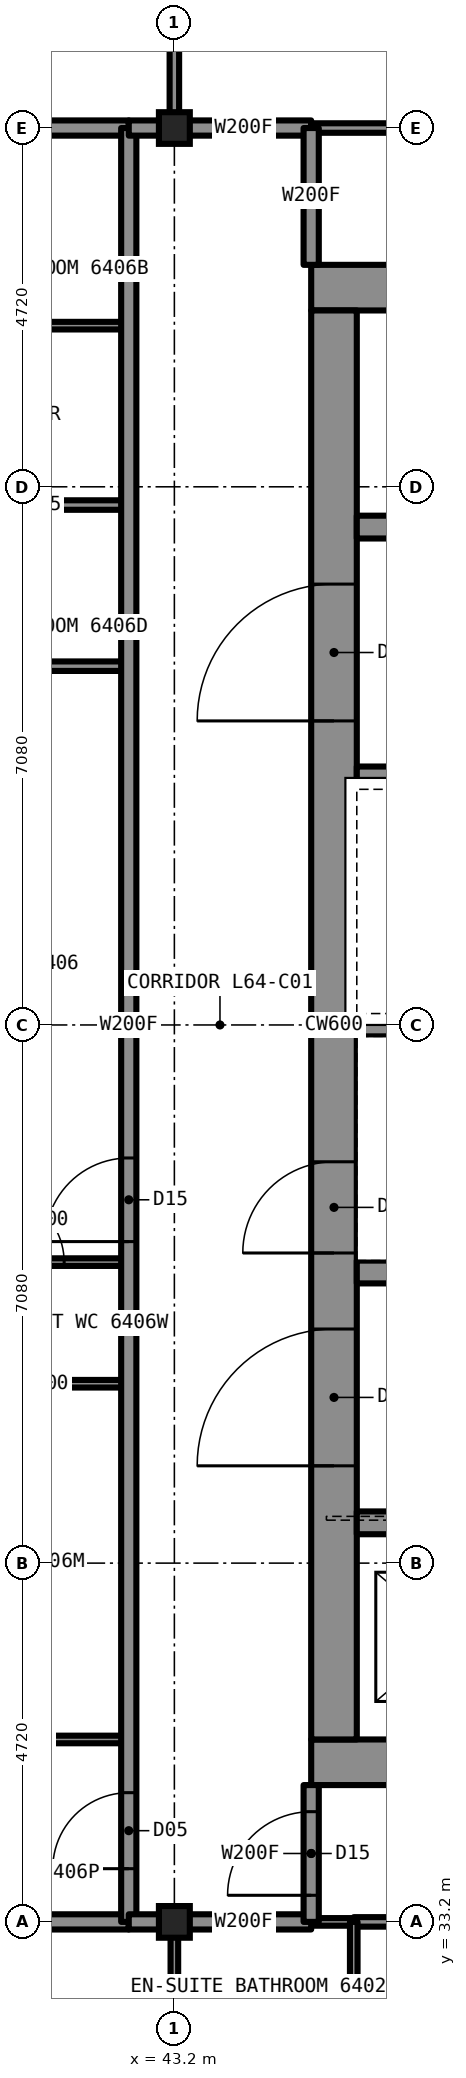
"""IFC4 building model, lengths in metres.
Left out: names, types, materials, properties, quantities, classifications, styles, units other than length and angle.
Written with IfcOpenShell. Run it as: python <this file> out.ifc"""

import sys

from ifc_helpers import new_model, si_unit, direction, frame, frame_2d, origin, origin_2d, place, context, subcontext, project, spatial, rectangle, i_section, extrude, element, fill, save


model = new_model("IFC4")
c1 = context("Model", 3, precision=1e-05, world=origin(), true_north=direction((0.0, 1.0)))
c2 = subcontext(c1, "Body", "Model", "MODEL_VIEW")
j1 = project(units=[si_unit("LENGTHUNIT", "METRE"), si_unit("PLANEANGLEUNIT", "RADIAN")], contexts=[c1])
p1 = place(None, origin())
s1 = spatial("IfcSite", under=j1, at=p1, CompositionType="ELEMENT")
p2 = place(p1, origin())
s2 = spatial("IfcBuilding", under=s1, at=p2, CompositionType="ELEMENT")
p3 = place(p2, frame((0.0, 0.0, 237.2)))
s3 = spatial("IfcBuildingStorey", under=s2, at=p3, CompositionType="ELEMENT", Elevation=237.2)
for number, where, z_axis, x_axis in (
    (1, (43.2, 33.2, 0.0), (0.0, 0.0, 1.0), (1.0, 0.0, 0.0)),
    (2, (43.2, 56.8, 0.0), (0.0, 0.0, 1.0), (1.0, 0.0, 0.0)),
):
    element("IfcColumn", number, at=place(p3, frame(where, z_axis=z_axis, x_axis=x_axis)), inside=s3, PredefinedType="COLUMN", context=c2, shape_type="SweptSolid", body=[
        extrude(i_section(OverallWidth=0.406, OverallDepth=0.417, WebThickness=0.03, FlangeThickness=0.048, at=origin_2d()), origin(), (0.0, 0.0, 1.0), 3.5),
    ])
for number, where, z_axis, x_axis in (
    (3, (45.0, 54.7, 0.0), (0.0, 0.0, 1.0), (1.0, 0.0, 0.0)),
    (4, (45.0, 35.3, 0.0), (0.0, 0.0, 1.0), (1.0, 0.0, 0.0)),
):
    element("IfcWall", number, at=place(p3, frame(where, z_axis=z_axis, x_axis=x_axis)), inside=s3, PredefinedType="SHEAR", context=c2, shape_type="SweptSolid", body=[
        extrude(rectangle(XDim=20.0, YDim=0.6, at=frame_2d((10.0, 0.0))), origin(), (0.0, 0.0, 1.0), 3.5),
    ])
p4 = place(p3, frame((45.3, 35.6, 0.0), z_axis=(0.0, 0.0, 1.0), x_axis=(0.0, 1.0, 0.0)))
e5 = element("IfcWall", 5, at=p4, inside=s3, PredefinedType="SHEAR", context=c2, shape_type="SweptSolid", body=[
    extrude(rectangle(XDim=18.8, YDim=0.6, at=frame_2d((9.4, 0.0))), origin(), (0.0, 0.0, 1.0), 3.5),
])
p5 = place(p4, frame((13.4, 0.0, 0.0)))
e6 = element("IfcOpeningElement", 6, at=p5, cuts=e5, PredefinedType="OPENING", context=c2, shape_type="SweptSolid", body=[
    extrude(rectangle(XDim=1.8, YDim=2.2, at=frame_2d((0.9, 1.1))), frame((0.0, 0.31, 0.0), z_axis=(0.0, -1.0, 0.0), x_axis=(1.0, 0.0, 0.0)), (0.0, 0.0, 1.0), 0.62),
])
p6 = place(p4, frame((3.6, 0.0, 0.0)))
e7 = element("IfcOpeningElement", 7, at=p6, cuts=e5, PredefinedType="OPENING", context=c2, shape_type="SweptSolid", body=[
    extrude(rectangle(XDim=1.8, YDim=2.2, at=frame_2d((0.9, 1.1))), frame((0.0, 0.31, 0.0), z_axis=(0.0, -1.0, 0.0), x_axis=(1.0, 0.0, 0.0)), (0.0, 0.0, 1.0), 0.62),
])
p7 = place(p4, frame((6.4, 0.0, 0.0)))
e8 = element("IfcOpeningElement", 8, at=p7, cuts=e5, PredefinedType="OPENING", context=c2, shape_type="SweptSolid", body=[
    extrude(rectangle(XDim=1.2, YDim=2.2, at=frame_2d((0.6, 1.1))), frame((0.0, 0.31, 0.0), z_axis=(0.0, -1.0, 0.0), x_axis=(1.0, 0.0, 0.0)), (0.0, 0.0, 1.0), 0.62),
])
p8 = place(p3, frame((45.6, 51.55, 0.0), z_axis=(0.0, 0.0, 1.0), x_axis=(1.0, 0.0, 0.0)))
e9 = element("IfcWall", 9, at=p8, inside=s3, PredefinedType="SHEAR", context=c2, shape_type="SweptSolid", body=[
    extrude(rectangle(XDim=18.8, YDim=0.3, at=frame_2d((9.4, 0.0))), origin(), (0.0, 0.0, 1.0), 3.5),
])
p9 = place(p8, frame((4.8, 0.0, 0.0)))
e10 = element("IfcOpeningElement", 10, at=p9, cuts=e9, PredefinedType="OPENING", context=c2, shape_type="SweptSolid", body=[
    extrude(rectangle(XDim=1.0, YDim=2.1, at=frame_2d((0.5, 1.05))), frame((0.0, 0.16, 0.0), z_axis=(0.0, -1.0, 0.0), x_axis=(1.0, 0.0, 0.0)), (0.0, 0.0, 1.0), 0.32),
])
p10 = place(p8, frame((11.6, 0.0, 0.0)))
e11 = element("IfcOpeningElement", 11, at=p10, cuts=e9, PredefinedType="OPENING", context=c2, shape_type="SweptSolid", body=[
    extrude(rectangle(XDim=1.1, YDim=2.2, at=frame_2d((0.55, 1.1))), frame((0.0, 0.16, 0.0), z_axis=(0.0, -1.0, 0.0), x_axis=(1.0, 0.0, 0.0)), (0.0, 0.0, 1.0), 0.32),
])
p11 = place(p8, frame((14.3, 0.0, 0.0)))
e12 = element("IfcOpeningElement", 12, at=p11, cuts=e9, PredefinedType="OPENING", context=c2, shape_type="SweptSolid", body=[
    extrude(rectangle(XDim=1.1, YDim=2.2, at=frame_2d((0.55, 1.1))), frame((0.0, 0.16, 0.0), z_axis=(0.0, -1.0, 0.0), x_axis=(1.0, 0.0, 0.0)), (0.0, 0.0, 1.0), 0.32),
])
p12 = place(p3, frame((45.6, 38.45, 0.0), z_axis=(0.0, 0.0, 1.0), x_axis=(1.0, 0.0, 0.0)))
e13 = element("IfcWall", 13, at=p12, inside=s3, PredefinedType="SHEAR", context=c2, shape_type="SweptSolid", body=[
    extrude(rectangle(XDim=18.8, YDim=0.3, at=frame_2d((9.4, 0.0))), origin(), (0.0, 0.0, 1.0), 3.5),
])
p13 = place(p12, frame((0.7, 0.0, 0.0)))
e14 = element("IfcOpeningElement", 14, at=p13, cuts=e13, PredefinedType="OPENING", context=c2, shape_type="SweptSolid", body=[
    extrude(rectangle(XDim=1.1, YDim=2.2, at=frame_2d((0.55, 1.1))), frame((0.0, 0.16, 0.0), z_axis=(0.0, -1.0, 0.0), x_axis=(1.0, 0.0, 0.0)), (0.0, 0.0, 1.0), 0.32),
])
p14 = place(p12, frame((3.4, 0.0, 0.0)))
e15 = element("IfcOpeningElement", 15, at=p14, cuts=e13, PredefinedType="OPENING", context=c2, shape_type="SweptSolid", body=[
    extrude(rectangle(XDim=1.1, YDim=2.2, at=frame_2d((0.55, 1.1))), frame((0.0, 0.16, 0.0), z_axis=(0.0, -1.0, 0.0), x_axis=(1.0, 0.0, 0.0)), (0.0, 0.0, 1.0), 0.32),
])
p15 = place(p12, frame((6.1, 0.0, 0.0)))
e16 = element("IfcOpeningElement", 16, at=p15, cuts=e13, PredefinedType="OPENING", context=c2, shape_type="SweptSolid", body=[
    extrude(rectangle(XDim=1.1, YDim=2.2, at=frame_2d((0.55, 1.1))), frame((0.0, 0.16, 0.0), z_axis=(0.0, -1.0, 0.0), x_axis=(1.0, 0.0, 0.0)), (0.0, 0.0, 1.0), 0.32),
])
p16 = place(p12, frame((8.8, 0.0, 0.0)))
e17 = element("IfcOpeningElement", 17, at=p16, cuts=e13, PredefinedType="OPENING", context=c2, shape_type="SweptSolid", body=[
    extrude(rectangle(XDim=1.1, YDim=2.2, at=frame_2d((0.55, 1.1))), frame((0.0, 0.16, 0.0), z_axis=(0.0, -1.0, 0.0), x_axis=(1.0, 0.0, 0.0)), (0.0, 0.0, 1.0), 0.32),
])
for number, where, z_axis, x_axis in (
    (18, (45.6, 48.25, 0.0), (0.0, 0.0, 1.0), (1.0, 0.0, 0.0)),
    (19, (45.6, 41.75, 0.0), (0.0, 0.0, 1.0), (1.0, 0.0, 0.0)),
):
    element("IfcWall", number, at=place(p3, frame(where, z_axis=z_axis, x_axis=x_axis)), inside=s3, PredefinedType="SHEAR", context=c2, shape_type="SweptSolid", body=[
        extrude(rectangle(XDim=7.1, YDim=0.3, at=frame_2d((3.55, 0.0))), origin(), (0.0, 0.0, 1.0), 3.5),
    ])
p17 = place(p3, frame((45.6, 45.0, 0.0), z_axis=(0.0, 0.0, 1.0), x_axis=(1.0, 0.0, 0.0)))
e20 = element("IfcWall", 20, at=p17, inside=s3, PredefinedType="SHEAR", context=c2, shape_type="SweptSolid", body=[
    extrude(rectangle(XDim=6.8, YDim=0.3, at=frame_2d((3.4, 0.0))), origin(), (0.0, 0.0, 1.0), 3.5),
])
p18 = place(p3, frame((45.0, 33.2, 0.0), z_axis=(0.0, 0.0, 1.0), x_axis=(1.0, 0.0, 0.0)))
e21 = element("IfcWall", 21, at=p18, inside=s3, PredefinedType="PARTITIONING", context=c2, shape_type="SweptSolid", body=[
    extrude(rectangle(XDim=0.56, YDim=0.1, at=frame_2d((0.28, 0.0))), origin(), (0.0, 0.0, 1.0), 3.33),
])
p19 = place(p3, frame((43.22, 33.2, 0.0), z_axis=(0.0, 0.0, 1.0), x_axis=(1.0, 0.0, 0.0)))
e22 = element("IfcWall", 22, at=p19, inside=s3, PredefinedType="PARTITIONING", context=c2, shape_type="SweptSolid", body=[
    extrude(rectangle(XDim=1.78, YDim=0.2, at=frame_2d((0.89, 0.0))), origin(), (0.0, 0.0, 1.0), 3.33),
])
p20 = place(p3, frame((37.3, 33.2, 0.0), z_axis=(0.0, 0.0, 1.0), x_axis=(1.0, 0.0, 0.0)))
e23 = element("IfcWall", 23, at=p20, inside=s3, PredefinedType="PARTITIONING", context=c2, shape_type="SweptSolid", body=[
    extrude(rectangle(XDim=5.3, YDim=0.2, at=frame_2d((2.65, 0.0))), origin(), (0.0, 0.0, 1.0), 2.573),
])
p21 = place(p3, frame((45.56, 33.2, 0.0), z_axis=(0.0, 0.0, 1.0), x_axis=(1.0, 0.0, 0.0)))
e24 = element("IfcWall", 24, at=p21, inside=s3, PredefinedType="PARTITIONING", context=c2, shape_type="SweptSolid", body=[
    extrude(rectangle(XDim=7.84, YDim=0.125, at=frame_2d((3.92, 0.0))), origin(), (0.0, 0.0, 1.0), 3.33),
])
p22 = place(p21, frame((3.49, 0.0, 0.0)))
e25 = element("IfcOpeningElement", 25, at=p22, cuts=e24, PredefinedType="OPENING", context=c2, shape_type="SweptSolid", body=[
    extrude(rectangle(XDim=0.9, YDim=2.2, at=frame_2d((0.45, 1.1))), frame((0.0, 0.073, 0.0), z_axis=(0.0, -1.0, 0.0), x_axis=(1.0, 0.0, 0.0)), (0.0, 0.0, 1.0), 0.145),
])
p23 = place(p3, frame((40.4, 41.88, 0.0), z_axis=(0.0, 0.0, 1.0), x_axis=(1.0, 0.0, 0.0)))
e26 = element("IfcWall", 26, at=p23, inside=s3, PredefinedType="PARTITIONING", context=c2, shape_type="SweptSolid", body=[
    extrude(rectangle(XDim=2.2, YDim=0.1, at=frame_2d((1.1, 0.0))), origin(), (0.0, 0.0, 1.0), 3.33),
])
p24 = place(p23, frame((0.45, 0.0, 0.0)))
e27 = element("IfcOpeningElement", 27, at=p24, cuts=e26, PredefinedType="OPENING", context=c2, shape_type="SweptSolid", body=[
    extrude(rectangle(XDim=0.9, YDim=2.1, at=frame_2d((0.45, 1.05))), frame((0.0, 0.06, 0.0), z_axis=(0.0, -1.0, 0.0), x_axis=(1.0, 0.0, 0.0)), (0.0, 0.0, 1.0), 0.12),
])
p25 = place(p3, frame((40.4, 40.28, 0.0), z_axis=(0.0, 0.0, 1.0), x_axis=(1.0, 0.0, 0.0)))
e28 = element("IfcWall", 28, at=p25, inside=s3, PredefinedType="PARTITIONING", context=c2, shape_type="SweptSolid", body=[
    extrude(rectangle(XDim=2.2, YDim=0.1, at=frame_2d((1.1, 0.0))), origin(), (0.0, 0.0, 1.0), 2.797),
])
p26 = place(p3, frame((40.0, 35.6, 0.0), z_axis=(0.0, 0.0, 1.0), x_axis=(1.0, 0.0, 0.0)))
e29 = element("IfcWall", 29, at=p26, inside=s3, PredefinedType="PARTITIONING", context=c2, shape_type="SweptSolid", body=[
    extrude(rectangle(XDim=2.6, YDim=0.1, at=frame_2d((1.3, 0.0))), origin(), (0.0, 0.0, 1.0), 2.797),
])
p27 = place(p3, frame((43.22, 56.8, 0.0), z_axis=(0.0, 0.0, 1.0), x_axis=(1.0, 0.0, 0.0)))
e30 = element("IfcWall", 30, at=p27, inside=s3, PredefinedType="PARTITIONING", context=c2, shape_type="SweptSolid", body=[
    extrude(rectangle(XDim=1.78, YDim=0.2, at=frame_2d((0.89, 0.0))), origin(), (0.0, 0.0, 1.0), 3.33),
])
p28 = place(p3, frame((37.3, 56.8, 0.0), z_axis=(0.0, 0.0, 1.0), x_axis=(1.0, 0.0, 0.0)))
e31 = element("IfcWall", 31, at=p28, inside=s3, PredefinedType="PARTITIONING", context=c2, shape_type="SweptSolid", body=[
    extrude(rectangle(XDim=5.3, YDim=0.2, at=frame_2d((2.65, 0.0))), origin(), (0.0, 0.0, 1.0), 2.573),
])
p29 = place(p3, frame((45.0, 56.8, 0.0), z_axis=(0.0, 0.0, 1.0), x_axis=(1.0, 0.0, 0.0)))
e32 = element("IfcWall", 32, at=p29, inside=s3, PredefinedType="PARTITIONING", context=c2, shape_type="SweptSolid", body=[
    extrude(rectangle(XDim=2.92, YDim=0.125, at=frame_2d((1.46, 0.0))), origin(), (0.0, 0.0, 1.0), 3.33),
])
p30 = place(p3, frame((37.3, 49.72, 0.0), z_axis=(0.0, 0.0, 1.0), x_axis=(1.0, 0.0, 0.0)))
e33 = element("IfcWall", 33, at=p30, inside=s3, PredefinedType="PARTITIONING", context=c2, shape_type="SweptSolid", body=[
    extrude(rectangle(XDim=5.3, YDim=0.125, at=frame_2d((2.65, 0.0))), origin(), (0.0, 0.0, 1.0), 2.797),
])
p31 = place(p30, frame((0.85, 0.0, 0.0)))
e34 = element("IfcOpeningElement", 34, at=p31, cuts=e33, PredefinedType="OPENING", context=c2, shape_type="SweptSolid", body=[
    extrude(rectangle(XDim=0.9, YDim=2.2, at=frame_2d((0.45, 1.1))), frame((0.0, 0.073, 0.0), z_axis=(0.0, -1.0, 0.0), x_axis=(1.0, 0.0, 0.0)), (0.0, 0.0, 1.0), 0.145),
])
p32 = place(p3, frame((40.2, 51.84, 0.0), z_axis=(0.0, 0.0, 1.0), x_axis=(1.0, 0.0, 0.0)))
e35 = element("IfcWall", 35, at=p32, inside=s3, PredefinedType="PARTITIONING", context=c2, shape_type="SweptSolid", body=[
    extrude(rectangle(XDim=2.4, YDim=0.125, at=frame_2d((1.2, 0.0))), origin(), (0.0, 0.0, 1.0), 3.33),
])
p33 = place(p3, frame((39.6, 54.2, 0.0), z_axis=(0.0, 0.0, 1.0), x_axis=(1.0, 0.0, 0.0)))
e36 = element("IfcWall", 36, at=p33, inside=s3, PredefinedType="PARTITIONING", context=c2, shape_type="SweptSolid", body=[
    extrude(rectangle(XDim=3.0, YDim=0.1, at=frame_2d((1.5, 0.0))), origin(), (0.0, 0.0, 1.0), 3.33),
])
p34 = place(p3, frame((45.0, 33.2, 0.0), z_axis=(0.0, 0.0, 1.0), x_axis=(0.0, 1.0, 0.0)))
e37 = element("IfcWall", 37, at=p34, inside=s3, PredefinedType="PARTITIONING", context=c2, shape_type="SweptSolid", body=[
    extrude(rectangle(XDim=1.8, YDim=0.2, at=frame_2d((0.9, 0.0))), origin(), (0.0, 0.0, 1.0), 3.33),
])
p35 = place(p34, frame((0.35, 0.0, 0.0)))
e38 = element("IfcOpeningElement", 38, at=p35, cuts=e37, PredefinedType="OPENING", context=c2, shape_type="SweptSolid", body=[
    extrude(rectangle(XDim=1.1, YDim=2.2, at=frame_2d((0.55, 1.1))), frame((0.0, 0.11, 0.0), z_axis=(0.0, -1.0, 0.0), x_axis=(1.0, 0.0, 0.0)), (0.0, 0.0, 1.0), 0.22),
])
p36 = place(p3, frame((45.0, 55.0, 0.0), z_axis=(0.0, 0.0, 1.0), x_axis=(0.0, 1.0, 0.0)))
e39 = element("IfcWall", 39, at=p36, inside=s3, PredefinedType="PARTITIONING", context=c2, shape_type="SweptSolid", body=[
    extrude(rectangle(XDim=1.8, YDim=0.2, at=frame_2d((0.9, 0.0))), origin(), (0.0, 0.0, 1.0), 3.33),
])
p37 = place(p3, frame((43.2, 30.4, 0.0), z_axis=(0.0, 0.0, 1.0), x_axis=(0.0, 1.0, 0.0)))
e40 = element("IfcWall", 40, at=p37, inside=s3, PredefinedType="PARTITIONING", context=c2, shape_type="SweptSolid", body=[
    extrude(rectangle(XDim=2.8, YDim=0.1, at=frame_2d((1.4, 0.0))), origin(), (0.0, 0.0, 1.0), 2.573),
])
p38 = place(p3, frame((43.2, 56.8, 0.0), z_axis=(0.0, 0.0, 1.0), x_axis=(0.0, 1.0, 0.0)))
e41 = element("IfcWall", 41, at=p38, inside=s3, PredefinedType="PARTITIONING", context=c2, shape_type="SweptSolid", body=[
    extrude(rectangle(XDim=5.9, YDim=0.125, at=frame_2d((2.95, 0.0))), origin(), (0.0, 0.0, 1.0), 2.573),
])
p39 = place(p38, frame((3.55, 0.0, 0.0)))
e42 = element("IfcOpeningElement", 42, at=p39, cuts=e41, PredefinedType="OPENING", context=c2, shape_type="SweptSolid", body=[
    extrude(rectangle(XDim=0.9, YDim=2.2, at=frame_2d((0.45, 1.1))), frame((0.0, 0.073, 0.0), z_axis=(0.0, -1.0, 0.0), x_axis=(1.0, 0.0, 0.0)), (0.0, 0.0, 1.0), 0.145),
])
p40 = place(p3, frame((42.6, 33.2, 0.0), z_axis=(0.0, 0.0, 1.0), x_axis=(0.0, 1.0, 0.0)))
e43 = element("IfcWall", 43, at=p40, inside=s3, PredefinedType="PARTITIONING", context=c2, shape_type="SweptSolid", body=[
    extrude(rectangle(XDim=23.6, YDim=0.2, at=frame_2d((11.8, 0.0))), origin(), (0.0, 0.0, 1.0), 3.33),
])
p41 = place(p40, frame((8.95, 0.0, 0.0)))
e44 = element("IfcOpeningElement", 44, at=p41, cuts=e43, PredefinedType="OPENING", context=c2, shape_type="SweptSolid", body=[
    extrude(rectangle(XDim=1.1, YDim=2.2, at=frame_2d((0.55, 1.1))), frame((0.0, 0.11, 0.0), z_axis=(0.0, -1.0, 0.0), x_axis=(1.0, 0.0, 0.0)), (0.0, 0.0, 1.0), 0.22),
])
p42 = place(p40, frame((0.7, 0.0, 0.0)))
e45 = element("IfcOpeningElement", 45, at=p42, cuts=e43, PredefinedType="OPENING", context=c2, shape_type="SweptSolid", body=[
    extrude(rectangle(XDim=1.0, YDim=2.1, at=frame_2d((0.5, 1.05))), frame((0.0, 0.11, 0.0), z_axis=(0.0, -1.0, 0.0), x_axis=(1.0, 0.0, 0.0)), (0.0, 0.0, 1.0), 0.22),
])
p43 = place(p3, frame((45.56, 30.4, 0.0), z_axis=(0.0, 0.0, 1.0), x_axis=(0.0, 1.0, 0.0)))
e46 = element("IfcWall", 46, at=p43, inside=s3, PredefinedType="PARTITIONING", context=c2, shape_type="SweptSolid", body=[
    extrude(rectangle(XDim=2.8, YDim=0.1, at=frame_2d((1.4, 0.0))), origin(), (0.0, 0.0, 1.0), 3.33),
])
for number, where, z_axis, x_axis in (
    (47, (42.6, 33.2, 0.0), (0.0, 0.0, 1.0), (1.0, 0.0, 0.0)),
    (48, (42.6, 56.8, 0.0), (0.0, 0.0, 1.0), (1.0, 0.0, 0.0)),
):
    element("IfcWall", number, at=place(p3, frame(where, z_axis=z_axis, x_axis=x_axis)), inside=s3, PredefinedType="PARTITIONING", context=c2, shape_type="SweptSolid", body=[
        extrude(rectangle(XDim=0.62, YDim=0.2, at=frame_2d((0.31, 0.0))), origin(), (0.0, 0.0, 1.0), 2.573),
    ])
p44 = place(p35, origin())
e49 = element("IfcDoor", 49, at=p44, inside=s3, OperationType="SINGLE_SWING_LEFT", PredefinedType="DOOR", context=c2, shape_type="SweptSolid", body=[
    extrude(rectangle(XDim=1.1, YDim=2.2, at=frame_2d((0.55, 1.1))), frame((0.0, 0.025, 0.0), z_axis=(0.0, -1.0, 0.0), x_axis=(1.0, 0.0, 0.0)), (0.0, 0.0, 1.0), 0.05),
])
fill(e38, e49)
p45 = place(p41, origin())
e50 = element("IfcDoor", 50, at=p45, inside=s3, OperationType="SINGLE_SWING_LEFT", PredefinedType="DOOR", context=c2, shape_type="SweptSolid", body=[
    extrude(rectangle(XDim=1.1, YDim=2.2, at=frame_2d((0.55, 1.1))), frame((0.0, 0.025, 0.0), z_axis=(0.0, -1.0, 0.0), x_axis=(1.0, 0.0, 0.0)), (0.0, 0.0, 1.0), 0.05),
])
fill(e44, e50)
p46 = place(p42, origin())
e51 = element("IfcDoor", 51, at=p46, inside=s3, OperationType="SINGLE_SWING_LEFT", PredefinedType="DOOR", context=c2, shape_type="SweptSolid", body=[
    extrude(rectangle(XDim=1.0, YDim=2.1, at=frame_2d((0.5, 1.05))), frame((0.0, 0.025, 0.0), z_axis=(0.0, -1.0, 0.0), x_axis=(1.0, 0.0, 0.0)), (0.0, 0.0, 1.0), 0.05),
])
fill(e45, e51)
p47 = place(p24, origin())
e52 = element("IfcDoor", 52, at=p47, inside=s3, OperationType="SINGLE_SWING_LEFT", PredefinedType="DOOR", context=c2, shape_type="SweptSolid", body=[
    extrude(rectangle(XDim=0.9, YDim=2.1, at=frame_2d((0.45, 1.05))), frame((0.0, 0.025, 0.0), z_axis=(0.0, -1.0, 0.0), x_axis=(1.0, 0.0, 0.0)), (0.0, 0.0, 1.0), 0.05),
])
fill(e27, e52)
p48 = place(p5, origin())
e53 = element("IfcDoor", 53, at=p48, inside=s3, OperationType="DOUBLE_DOOR_SINGLE_SWING", PredefinedType="DOOR", context=c2, shape_type="SweptSolid", body=[
    extrude(rectangle(XDim=1.8, YDim=2.2, at=frame_2d((0.9, 1.1))), frame((0.0, 0.025, 0.0), z_axis=(0.0, -1.0, 0.0), x_axis=(1.0, 0.0, 0.0)), (0.0, 0.0, 1.0), 0.05),
])
fill(e6, e53)
p49 = place(p6, origin())
e54 = element("IfcDoor", 54, at=p49, inside=s3, OperationType="DOUBLE_DOOR_SINGLE_SWING", PredefinedType="DOOR", context=c2, shape_type="SweptSolid", body=[
    extrude(rectangle(XDim=1.8, YDim=2.2, at=frame_2d((0.9, 1.1))), frame((0.0, 0.025, 0.0), z_axis=(0.0, -1.0, 0.0), x_axis=(1.0, 0.0, 0.0)), (0.0, 0.0, 1.0), 0.05),
])
fill(e7, e54)
p50 = place(p7, origin())
e55 = element("IfcDoor", 55, at=p50, inside=s3, OperationType="SINGLE_SWING_LEFT", PredefinedType="DOOR", context=c2, shape_type="SweptSolid", body=[
    extrude(rectangle(XDim=1.2, YDim=2.2, at=frame_2d((0.6, 1.1))), frame((0.0, 0.025, 0.0), z_axis=(0.0, -1.0, 0.0), x_axis=(1.0, 0.0, 0.0)), (0.0, 0.0, 1.0), 0.05),
])
fill(e8, e55)
save(model, sys.argv[1])
